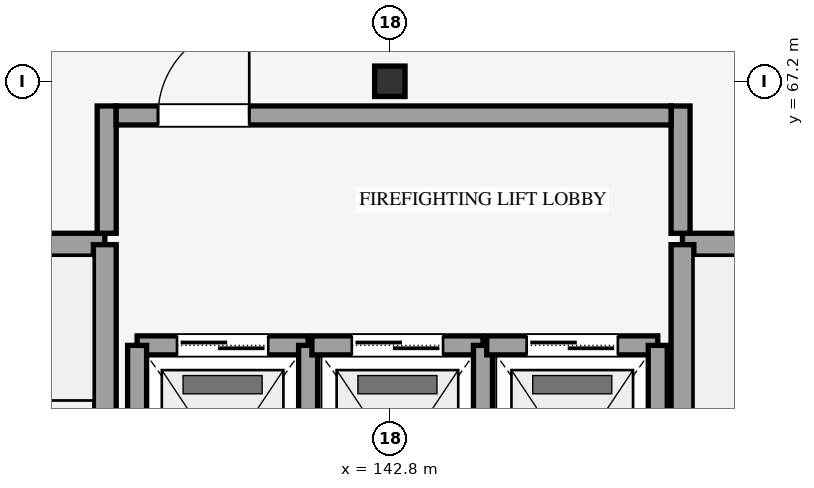
"""IFC4 building model, lengths in metres.
Left out: names, types, materials, properties, quantities, classifications, styles, units other than length and angle.
Written with IfcOpenShell. Run it as: python <this file> out.ifc"""

import sys

from ifc_helpers import new_model, si_unit, direction, frame, frame_2d, origin, origin_2d, place, context, subcontext, project, spatial, rectangle, i_section, extrude, element, fill, save


model = new_model("IFC4")
c1 = context("Model", 3, precision=1e-05, world=origin(), true_north=direction((0.0, 1.0)))
c2 = subcontext(c1, "Body", "Model", "MODEL_VIEW")
j1 = project(units=[si_unit("LENGTHUNIT", "METRE"), si_unit("PLANEANGLEUNIT", "RADIAN")], contexts=[c1])
p1 = place(None, origin())
s1 = spatial("IfcSite", under=j1, at=p1, CompositionType="ELEMENT")
p2 = place(p1, origin())
s2 = spatial("IfcBuilding", under=s1, at=p2, CompositionType="ELEMENT")
p3 = place(p2, frame((0.0, 0.0, 32.1)))
s3 = spatial("IfcBuildingStorey", under=s2, at=p3, CompositionType="ELEMENT", Elevation=32.1)
p4 = place(p3, frame((142.8, 67.2, 0.0), z_axis=(0.0, 0.0, 1.0), x_axis=(1.0, 0.0, 0.0)))
e1 = element("IfcColumn", 1, at=p4, inside=s3, PredefinedType="COLUMN", context=c2, shape_type="SweptSolid", body=[
    extrude(i_section(OverallWidth=0.4, OverallDepth=0.4, WebThickness=0.013, FlangeThickness=0.021, FilletRadius=0.022, at=origin_2d()), origin(), (0.0, 0.0, 1.0), 4.2),
])
p5 = place(p3, frame((135.05, 65.05, 0.0), z_axis=(0.0, 0.0, 1.0), x_axis=(1.0, 0.0, 0.0)))
e2 = element("IfcWall", 2, at=p5, inside=s3, PredefinedType="SHEAR", context=c2, shape_type="SweptSolid", body=[
    extrude(rectangle(XDim=4.0, YDim=0.3, at=frame_2d((2.0, 0.0))), origin(), (0.0, 0.0, 1.0), 4.2),
])
p6 = place(p3, frame((139.05, 50.75, 0.0), z_axis=(0.0, 0.0, 1.0), x_axis=(0.0, 1.0, 0.0)))
e3 = element("IfcWall", 3, at=p6, inside=s3, PredefinedType="SHEAR", context=c2, shape_type="SweptSolid", body=[
    extrude(rectangle(XDim=14.3, YDim=0.3, at=frame_2d((7.15, 0.0))), origin(), (0.0, 0.0, 1.0), 4.2),
])
p7 = place(p3, frame((146.65, 65.05, 0.0), z_axis=(0.0, 0.0, 1.0), x_axis=(1.0, 0.0, 0.0)))
e4 = element("IfcWall", 4, at=p7, inside=s3, PredefinedType="SHEAR", context=c2, shape_type="SweptSolid", body=[
    extrude(rectangle(XDim=4.0, YDim=0.3, at=frame_2d((2.0, 0.0))), origin(), (0.0, 0.0, 1.0), 4.2),
])
p8 = place(p3, frame((146.65, 50.75, 0.0), z_axis=(0.0, 0.0, 1.0), x_axis=(0.0, 1.0, 0.0)))
e5 = element("IfcWall", 5, at=p8, inside=s3, PredefinedType="SHEAR", context=c2, shape_type="SweptSolid", body=[
    extrude(rectangle(XDim=14.3, YDim=0.3, at=frame_2d((7.15, 0.0))), origin(), (0.0, 0.0, 1.0), 4.2),
])
p9 = place(p3, frame((139.475, 63.725, 0.0), z_axis=(0.0, 0.0, 1.0), x_axis=(1.0, 0.0, 0.0)))
e6 = element("IfcWall", 6, at=p9, inside=s3, PredefinedType="SHEAR", context=c2, shape_type="SweptSolid", body=[
    extrude(rectangle(XDim=2.25, YDim=0.25, at=frame_2d((1.125, 0.0))), origin(), (0.0, 0.0, 1.0), 3.96),
])
p10 = place(p9, frame((0.525, 0.0, 0.0)))
e7 = element("IfcOpeningElement", 7, at=p10, cuts=e6, PredefinedType="OPENING", context=c2, shape_type="SweptSolid", body=[
    extrude(rectangle(XDim=1.2, YDim=2.18, at=frame_2d((0.6, 1.09))), frame((0.0, 0.135, 0.0), z_axis=(0.0, -1.0, 0.0), x_axis=(1.0, 0.0, 0.0)), (0.0, 0.0, 1.0), 0.27),
])
for number, where, z_axis, x_axis in (
    (8, (139.475, 60.675, 0.0), (0.0, 0.0, 1.0), (0.0, 1.0, 0.0)),
    (9, (141.725, 60.675, 0.0), (0.0, 0.0, 1.0), (0.0, 1.0, 0.0)),
):
    element("IfcWall", number, at=place(p3, frame(where, z_axis=z_axis, x_axis=x_axis)), inside=s3, PredefinedType="SHEAR", context=c2, shape_type="SweptSolid", body=[
        extrude(rectangle(XDim=3.05, YDim=0.25, at=frame_2d((1.525, 0.0))), origin(), (0.0, 0.0, 1.0), 3.96),
    ])
p11 = place(p3, frame((141.775, 63.725, 0.0), z_axis=(0.0, 0.0, 1.0), x_axis=(1.0, 0.0, 0.0)))
e10 = element("IfcWall", 10, at=p11, inside=s3, PredefinedType="SHEAR", context=c2, shape_type="SweptSolid", body=[
    extrude(rectangle(XDim=2.25, YDim=0.25, at=frame_2d((1.125, 0.0))), origin(), (0.0, 0.0, 1.0), 3.96),
])
p12 = place(p11, frame((0.525, 0.0, 0.0)))
e11 = element("IfcOpeningElement", 11, at=p12, cuts=e10, PredefinedType="OPENING", context=c2, shape_type="SweptSolid", body=[
    extrude(rectangle(XDim=1.2, YDim=2.18, at=frame_2d((0.6, 1.09))), frame((0.0, 0.135, 0.0), z_axis=(0.0, -1.0, 0.0), x_axis=(1.0, 0.0, 0.0)), (0.0, 0.0, 1.0), 0.27),
])
p13 = place(p3, frame((144.025, 60.675, 0.0), z_axis=(0.0, 0.0, 1.0), x_axis=(0.0, 1.0, 0.0)))
e12 = element("IfcWall", 12, at=p13, inside=s3, PredefinedType="SHEAR", context=c2, shape_type="SweptSolid", body=[
    extrude(rectangle(XDim=3.05, YDim=0.25, at=frame_2d((1.525, 0.0))), origin(), (0.0, 0.0, 1.0), 3.96),
])
p14 = place(p3, frame((144.075, 63.725, 0.0), z_axis=(0.0, 0.0, 1.0), x_axis=(1.0, 0.0, 0.0)))
e13 = element("IfcWall", 13, at=p14, inside=s3, PredefinedType="SHEAR", context=c2, shape_type="SweptSolid", body=[
    extrude(rectangle(XDim=2.25, YDim=0.25, at=frame_2d((1.125, 0.0))), origin(), (0.0, 0.0, 1.0), 3.96),
])
p15 = place(p14, frame((0.525, 0.0, 0.0)))
e14 = element("IfcOpeningElement", 14, at=p15, cuts=e13, PredefinedType="OPENING", context=c2, shape_type="SweptSolid", body=[
    extrude(rectangle(XDim=1.2, YDim=2.18, at=frame_2d((0.6, 1.09))), frame((0.0, 0.135, 0.0), z_axis=(0.0, -1.0, 0.0), x_axis=(1.0, 0.0, 0.0)), (0.0, 0.0, 1.0), 0.27),
])
p16 = place(p3, frame((146.325, 60.675, 0.0), z_axis=(0.0, 0.0, 1.0), x_axis=(0.0, 1.0, 0.0)))
e15 = element("IfcWall", 15, at=p16, inside=s3, PredefinedType="SHEAR", context=c2, shape_type="SweptSolid", body=[
    extrude(rectangle(XDim=3.05, YDim=0.25, at=frame_2d((1.525, 0.0))), origin(), (0.0, 0.0, 1.0), 3.96),
])
for number, where, z_axis, x_axis in (
    (16, (139.075, 65.2, 0.0), (0.0, 0.0, 1.0), (0.0, 1.0, 0.0)),
    (17, (146.625, 65.2, 0.0), (0.0, 0.0, 1.0), (0.0, 1.0, 0.0)),
):
    element("IfcWall", number, at=place(p3, frame(where, z_axis=z_axis, x_axis=x_axis)), inside=s3, PredefinedType="SHEAR", context=c2, shape_type="SweptSolid", body=[
        extrude(rectangle(XDim=1.675, YDim=0.25, at=frame_2d((0.837, 0.0))), origin(), (0.0, 0.0, 1.0), 3.96),
    ])
p17 = place(p3, frame((139.2, 66.75, 0.0), z_axis=(0.0, 0.0, 1.0), x_axis=(1.0, 0.0, 0.0)))
e18 = element("IfcWall", 18, at=p17, inside=s3, PredefinedType="SHEAR", context=c2, shape_type="SweptSolid", body=[
    extrude(rectangle(XDim=7.3, YDim=0.25, at=frame_2d((3.65, 0.0))), origin(), (0.0, 0.0, 1.0), 3.96),
])
p18 = place(p17, frame((0.55, 0.0, 0.0)))
e19 = element("IfcOpeningElement", 19, at=p18, cuts=e18, PredefinedType="OPENING", context=c2, shape_type="SweptSolid", body=[
    extrude(rectangle(XDim=1.2, YDim=2.15, at=frame_2d((0.6, 1.075))), frame((0.0, 0.135, 0.0), z_axis=(0.0, -1.0, 0.0), x_axis=(1.0, 0.0, 0.0)), (0.0, 0.0, 1.0), 0.27),
])
p19 = place(p10, origin())
e20 = element("IfcDoor", 20, at=p19, inside=s3, OperationType="DOUBLE_DOOR_SLIDING", PredefinedType="DOOR", context=c2, shape_type="SweptSolid", body=[
    extrude(rectangle(XDim=1.2, YDim=2.18, at=frame_2d((0.6, 1.09))), frame((0.0, 0.025, 0.0), z_axis=(0.0, -1.0, 0.0), x_axis=(1.0, 0.0, 0.0)), (0.0, 0.0, 1.0), 0.05),
])
fill(e7, e20)
p20 = place(p12, origin())
e21 = element("IfcDoor", 21, at=p20, inside=s3, OperationType="DOUBLE_DOOR_SLIDING", PredefinedType="DOOR", context=c2, shape_type="SweptSolid", body=[
    extrude(rectangle(XDim=1.2, YDim=2.18, at=frame_2d((0.6, 1.09))), frame((0.0, 0.025, 0.0), z_axis=(0.0, -1.0, 0.0), x_axis=(1.0, 0.0, 0.0)), (0.0, 0.0, 1.0), 0.05),
])
fill(e11, e21)
p21 = place(p15, origin())
e22 = element("IfcDoor", 22, at=p21, inside=s3, OperationType="DOUBLE_DOOR_SLIDING", PredefinedType="DOOR", context=c2, shape_type="SweptSolid", body=[
    extrude(rectangle(XDim=1.2, YDim=2.18, at=frame_2d((0.6, 1.09))), frame((0.0, 0.025, 0.0), z_axis=(0.0, -1.0, 0.0), x_axis=(1.0, 0.0, 0.0)), (0.0, 0.0, 1.0), 0.05),
])
fill(e14, e22)
p22 = place(p18, origin())
e23 = element("IfcDoor", 23, at=p22, inside=s3, OperationType="SINGLE_SWING_RIGHT", PredefinedType="DOOR", context=c2, shape_type="SweptSolid", body=[
    extrude(rectangle(XDim=1.2, YDim=2.15, at=frame_2d((0.6, 1.075))), frame((0.0, 0.025, 0.0), z_axis=(0.0, -1.0, 0.0), x_axis=(1.0, 0.0, 0.0)), (0.0, 0.0, 1.0), 0.05),
])
fill(e19, e23)
save(model, sys.argv[1])
